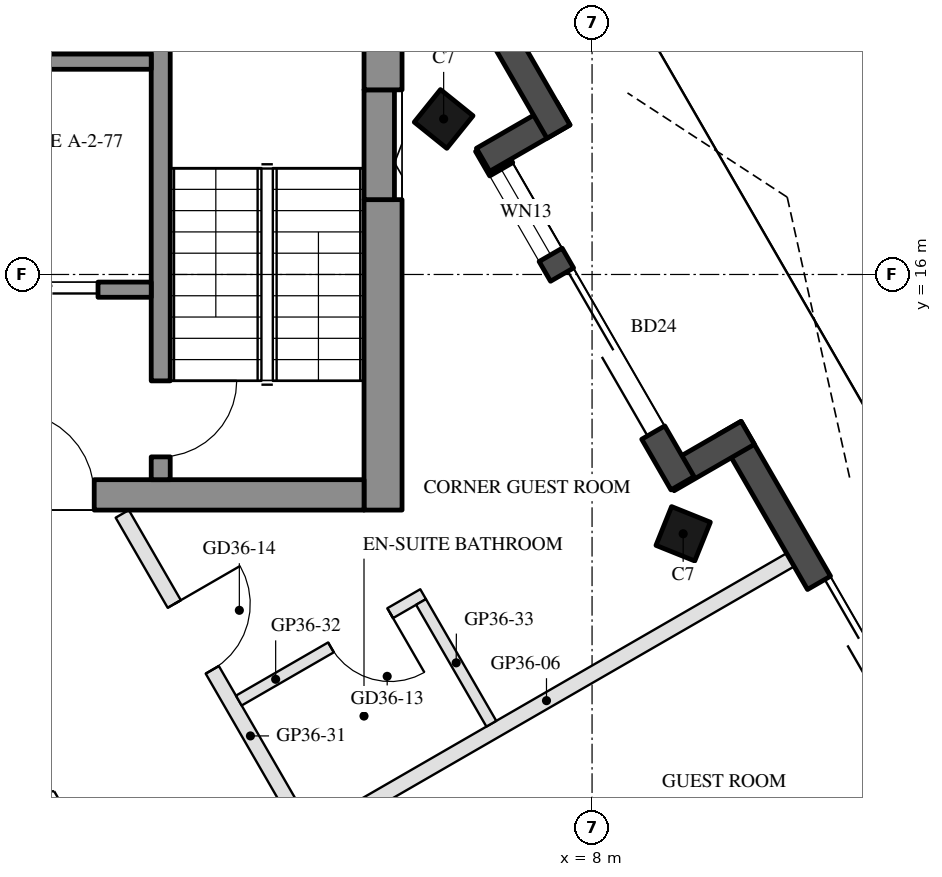
"""IFC4 building model, lengths in metres.
Left out: names, types, materials, properties, quantities, classifications, styles, units other than length and angle.
Written with IfcOpenShell. Run it as: python <this file> out.ifc"""

import sys

from ifc_helpers import new_model, si_unit, direction, frame, frame_2d, origin, origin_2d, place, context, subcontext, project, spatial, rectangle, hollow_rectangle, extrude, boolean, halfspace, element, fill, save


model = new_model("IFC4")
c1 = context("Model", 3, precision=1e-05, world=origin(), true_north=direction((0.0, 1.0)))
c2 = subcontext(c1, "Body", "Model", "MODEL_VIEW")
j1 = project(units=[si_unit("LENGTHUNIT", "METRE"), si_unit("PLANEANGLEUNIT", "RADIAN")], contexts=[c1])
p1 = place(None, origin())
s1 = spatial("IfcSite", under=j1, at=p1, CompositionType="ELEMENT")
p2 = place(p1, origin())
s2 = spatial("IfcBuilding", under=s1, at=p2, CompositionType="ELEMENT")
p3 = place(p2, frame((0.0, 0.0, 328.1)))
s3 = spatial("IfcBuildingStorey", under=s2, at=p3, CompositionType="ELEMENT", Elevation=328.1)
p4 = place(p3, frame((9.198, 12.588, 0.0), z_axis=(-0.100518021011, -0.128316722417, 0.98662604172), x_axis=(-0.503129383785, 0.862065632243, 0.060857775822)))
e1 = element("IfcColumn", 1, at=p4, inside=s3, PredefinedType="COLUMN", context=c2, shape_type="SweptSolid", body=[
    boolean("DIFFERENCE", boolean("DIFFERENCE", extrude(hollow_rectangle(XDim=0.55, YDim=0.55, WallThickness=0.025, at=origin_2d()), origin(), (0.0, 0.0, 1.0), 3.75), halfspace(frame((0.0, 0.0, 0.034), z_axis=(0.0, 0.0, 1.0), x_axis=(1.0, 0.0, 0.0)), True)), halfspace(frame((0.0, 0.0, 3.735), z_axis=(0.0, 0.0, 1.0), x_axis=(1.0, 0.0, 0.0)), False)),
])
p5 = place(p3, frame((6.047, 18.046, 0.0), z_axis=(-0.069728397733, -0.180050765176, 0.981182792608), x_axis=(-0.504276986778, 0.855013934028, 0.12106152661)))
e2 = element("IfcColumn", 2, at=p5, inside=s3, PredefinedType="COLUMN", context=c2, shape_type="SweptSolid", body=[
    boolean("DIFFERENCE", boolean("DIFFERENCE", extrude(hollow_rectangle(XDim=0.55, YDim=0.55, WallThickness=0.025, at=origin_2d()), origin(), (0.0, 0.0, 1.0), 3.771), halfspace(frame((0.0, 0.0, 0.04), z_axis=(0.0, 0.0, 1.0), x_axis=(1.0, 0.0, 0.0)), True)), halfspace(frame((0.0, 0.0, 3.753), z_axis=(0.0, 0.0, 1.0), x_axis=(1.0, 0.0, 0.0)), False)),
])
p6 = place(p3, frame((13.861, 6.963, 0.0), z_axis=(0.0, 0.0, 1.0), x_axis=(-0.499985896038, 0.866033546558, 0.0)))
e3 = element("IfcWall", 3, at=p6, inside=s3, PredefinedType="SOLIDWALL", context=c2, shape_type="SweptSolid", body=[
    extrude(rectangle(XDim=8.102, YDim=0.35, at=frame_2d((4.051, 0.0))), origin(), (0.0, 0.0, 1.0), 3.45),
])
p7 = place(p6, frame((3.95, 0.0, 0.0)))
e4 = element("IfcOpeningElement", 4, at=p7, cuts=e3, PredefinedType="OPENING", context=c2, shape_type="SweptSolid", body=[
    extrude(rectangle(XDim=1.8, YDim=2.4, at=frame_2d((0.9, 1.2))), frame((0.0, 0.185, 0.0), z_axis=(0.0, -1.0, 0.0), x_axis=(1.0, 0.0, 0.0)), (0.0, 0.0, 1.0), 0.37),
])
p8 = place(p6, frame((2.52, 0.0, 0.3)))
e5 = element("IfcOpeningElement", 5, at=p8, cuts=e3, PredefinedType="OPENING", context=c2, shape_type="SweptSolid", body=[
    extrude(rectangle(XDim=1.1, YDim=2.65, at=frame_2d((0.55, 1.325))), frame((0.0, 0.185, 0.0), z_axis=(0.0, -1.0, 0.0), x_axis=(1.0, 0.0, 0.0)), (0.0, 0.0, 1.0), 0.37),
])
p9 = place(p3, frame((10.049, 13.916, 0.0), z_axis=(0.0, 0.0, 1.0), x_axis=(-0.866005645448, -0.500034220881, 0.0)))
e6 = element("IfcWall", 6, at=p9, inside=s3, PredefinedType="SOLIDWALL", context=c2, shape_type="SweptSolid", body=[
    extrude(rectangle(XDim=1.22, YDim=0.35, at=frame_2d((0.61, 0.0))), origin(), (0.0, 0.0, 1.0), 3.45),
])
p10 = place(p3, frame((9.19, 13.253, 0.0), z_axis=(0.0, 0.0, 1.0), x_axis=(-0.499963552308, 0.866046445846, 0.0)))
e7 = element("IfcWall", 7, at=p10, inside=s3, PredefinedType="SOLIDWALL", context=c2, shape_type="SweptSolid", body=[
    extrude(rectangle(XDim=5.143, YDim=0.35, at=frame_2d((2.571, 0.0))), origin(), (0.0, 0.0, 1.0), 3.45),
])
p11 = place(p10, frame((0.77, 0.0, 0.0)))
e8 = element("IfcOpeningElement", 8, at=p11, cuts=e7, PredefinedType="OPENING", context=c2, shape_type="SweptSolid", body=[
    extrude(rectangle(XDim=2.4, YDim=2.4, at=frame_2d((1.2, 1.2))), frame((0.0, 0.185, 0.0), z_axis=(0.0, -1.0, 0.0), x_axis=(1.0, 0.0, 0.0)), (0.0, 0.0, 1.0), 0.37),
])
p12 = place(p10, frame((3.47, 0.0, 0.3)))
e9 = element("IfcOpeningElement", 9, at=p12, cuts=e7, PredefinedType="OPENING", context=c2, shape_type="SweptSolid", body=[
    extrude(rectangle(XDim=1.3, YDim=2.65, at=frame_2d((0.65, 1.325))), frame((0.0, 0.185, 0.0), z_axis=(0.0, -1.0, 0.0), x_axis=(1.0, 0.0, 0.0)), (0.0, 0.0, 1.0), 0.37),
])
p13 = place(p3, frame((6.566, 17.509, 0.0), z_axis=(0.0, 0.0, 1.0), x_axis=(0.866005645448, 0.500034220881, 0.0)))
e10 = element("IfcWall", 10, at=p13, inside=s3, PredefinedType="SOLIDWALL", context=c2, shape_type="SweptSolid", body=[
    extrude(rectangle(XDim=1.22, YDim=0.35, at=frame_2d((0.61, 0.0))), origin(), (0.0, 0.0, 1.0), 3.45),
])
p14 = place(p3, frame((7.558, 17.879, 0.0), z_axis=(0.0, 0.0, 1.0), x_axis=(-0.499967508769, 0.866044161793, 0.0)))
e11 = element("IfcWall", 11, at=p14, inside=s3, PredefinedType="SOLIDWALL", context=c2, shape_type="SweptSolid", body=[
    extrude(rectangle(XDim=3.306, YDim=0.35, at=frame_2d((1.653, 0.0))), origin(), (0.0, 0.0, 1.0), 3.45),
])
p15 = place(p14, frame((1.43, 0.0, 0.3)))
e12 = element("IfcOpeningElement", 12, at=p15, cuts=e11, PredefinedType="OPENING", context=c2, shape_type="SweptSolid", body=[
    extrude(rectangle(XDim=1.4, YDim=2.65, at=frame_2d((0.7, 1.325))), frame((0.0, 0.185, 0.0), z_axis=(0.0, -1.0, 0.0), x_axis=(1.0, 0.0, 0.0)), (0.0, 0.0, 1.0), 0.37),
])
p16 = place(p3, frame((5.25, 12.9, 0.0), z_axis=(0.0, 0.0, 1.0), x_axis=(0.0, 1.0, 0.0)))
e13 = element("IfcWall", 13, at=p16, inside=s3, PredefinedType="SHEAR", context=c2, shape_type="SweptSolid", body=[
    extrude(rectangle(XDim=4.085, YDim=0.5, at=frame_2d((2.042, 0.0))), origin(), (0.0, 0.0, 1.0), 3.45),
])
p17 = place(p3, frame((5.2, 16.985, 0.0), z_axis=(0.0, 0.0, 1.0), x_axis=(0.0, 1.0, 0.0)))
e14 = element("IfcWall", 14, at=p17, inside=s3, PredefinedType="SHEAR", context=c2, shape_type="SweptSolid", body=[
    extrude(rectangle(XDim=1.445, YDim=0.4, at=frame_2d((0.722, 0.0))), origin(), (0.0, 0.0, 1.0), 3.45),
])
p18 = place(p3, frame((5.25, 18.429, 0.0), z_axis=(0.0, 0.0, 1.0), x_axis=(0.0, 1.0, 0.0)))
e15 = element("IfcWall", 15, at=p18, inside=s3, PredefinedType="SHEAR", context=c2, shape_type="SweptSolid", body=[
    extrude(rectangle(XDim=2.738, YDim=0.5, at=frame_2d((1.369, 0.0))), origin(), (0.0, 0.0, 1.0), 3.45),
])
p19 = place(p3, frame((5.0, 13.1, 0.0), z_axis=(0.0, 0.0, 1.0), x_axis=(-1.0, 0.0, 0.0)))
e16 = element("IfcWall", 16, at=p19, inside=s3, PredefinedType="SHEAR", context=c2, shape_type="SweptSolid", body=[
    extrude(rectangle(XDim=10.0, YDim=0.4, at=frame_2d((5.0, 0.0))), origin(), (0.0, 0.0, 1.0), 3.45),
])
p20 = place(p19, frame((3.55, 0.0, 0.0)))
e17 = element("IfcOpeningElement", 17, at=p20, cuts=e16, PredefinedType="OPENING", context=c2, shape_type="SweptSolid", body=[
    extrude(rectangle(XDim=1.1, YDim=2.1, at=frame_2d((0.55, 1.05))), frame((0.0, 0.21, 0.0), z_axis=(0.0, -1.0, 0.0), x_axis=(1.0, 0.0, 0.0)), (0.0, 0.0, 1.0), 0.42),
])
p21 = place(p19, frame((5.85, 0.0, 0.0)))
e18 = element("IfcOpeningElement", 18, at=p21, cuts=e16, PredefinedType="OPENING", context=c2, shape_type="SweptSolid", body=[
    extrude(rectangle(XDim=1.4, YDim=2.1, at=frame_2d((0.7, 1.05))), frame((0.0, 0.21, 0.0), z_axis=(0.0, -1.0, 0.0), x_axis=(1.0, 0.0, 0.0)), (0.0, 0.0, 1.0), 0.42),
])
p22 = place(p3, frame((2.325, 13.3, 0.0), z_axis=(0.0, 0.0, 1.0), x_axis=(0.0, 1.0, 0.0)))
e19 = element("IfcWall", 19, at=p22, inside=s3, PredefinedType="SHEAR", context=c2, shape_type="SweptSolid", body=[
    extrude(rectangle(XDim=6.45, YDim=0.25, at=frame_2d((3.225, 0.0))), origin(), (0.0, 0.0, 1.0), 3.45),
])
p23 = place(p22, frame((0.3, 0.0, 0.0)))
e20 = element("IfcOpeningElement", 20, at=p23, cuts=e19, PredefinedType="OPENING", context=c2, shape_type="SweptSolid", body=[
    extrude(rectangle(XDim=1.0, YDim=2.1, at=frame_2d((0.5, 1.05))), frame((0.0, 0.135, 0.0), z_axis=(0.0, -1.0, 0.0), x_axis=(1.0, 0.0, 0.0)), (0.0, 0.0, 1.0), 0.27),
])
p24 = place(p3, frame((2.2, 18.8, 0.0), z_axis=(0.0, 0.0, 1.0), x_axis=(-1.0, 0.0, 0.0)))
e21 = element("IfcWall", 21, at=p24, inside=s3, PredefinedType="SHEAR", context=c2, shape_type="SweptSolid", body=[
    extrude(rectangle(XDim=2.8, YDim=0.2, at=frame_2d((1.4, 0.0))), origin(), (0.0, 0.0, 1.0), 3.45),
])
p25 = place(p3, frame((2.2, 15.8, 0.0), z_axis=(0.0, 0.0, 1.0), x_axis=(-1.0, 0.0, 0.0)))
e22 = element("IfcWall", 22, at=p25, inside=s3, PredefinedType="SHEAR", context=c2, shape_type="SweptSolid", body=[
    extrude(rectangle(XDim=2.8, YDim=0.2, at=frame_2d((1.4, 0.0))), origin(), (0.0, 0.0, 1.0), 3.45),
])
p26 = place(p25, frame((0.7, 0.0, 0.0)))
e23 = element("IfcOpeningElement", 23, at=p26, cuts=e22, PredefinedType="OPENING", context=c2, shape_type="SweptSolid", body=[
    extrude(rectangle(XDim=1.2, YDim=2.1, at=frame_2d((0.6, 1.05))), frame((0.0, 0.11, 0.0), z_axis=(0.0, -1.0, 0.0), x_axis=(1.0, 0.0, 0.0)), (0.0, 0.0, 1.0), 0.22),
])
p27 = place(p3, frame((10.609, 12.245, 0.0), z_axis=(0.0, 0.0, 1.0), x_axis=(-0.866014407023, -0.500019046465, 0.0)))
e24 = element("IfcWall", 24, at=p27, inside=s3, PredefinedType="PARTITIONING", context=c2, shape_type="SweptSolid", body=[
    extrude(rectangle(XDim=7.41, YDim=0.2, at=frame_2d((3.705, 0.0))), origin(), (0.0, 0.0, 1.0), 3.05),
])
p28 = place(p3, frame((1.819, 12.85, 0.0), z_axis=(0.0, 0.0, 1.0), x_axis=(0.500007490527, -0.866021079084, 0.0)))
e25 = element("IfcWall", 25, at=p28, inside=s3, PredefinedType="PARTITIONING", context=c2, shape_type="SweptSolid", body=[
    extrude(rectangle(XDim=4.819, YDim=0.2, at=frame_2d((2.41, 0.0))), origin(), (0.0, 0.0, 1.0), 3.05),
])
p29 = place(p28, frame((1.369, 0.0, 0.0)))
e26 = element("IfcOpeningElement", 26, at=p29, cuts=e25, PredefinedType="OPENING", context=c2, shape_type="SweptSolid", body=[
    extrude(rectangle(XDim=1.0, YDim=2.1, at=frame_2d((0.5, 1.05))), frame((0.0, 0.11, 0.0), z_axis=(0.0, -1.0, 0.0), x_axis=(1.0, 0.0, 0.0)), (0.0, 0.0, 1.0), 0.22),
])
p30 = place(p3, frame((5.777, 11.794, 0.0), z_axis=(0.0, 0.0, 1.0), x_axis=(-0.865996816683, -0.500049511043, 0.0)))
e27 = element("IfcWall", 27, at=p30, inside=s3, PredefinedType="PARTITIONING", context=c2, shape_type="SweptSolid", body=[
    extrude(rectangle(XDim=2.8, YDim=0.15, at=frame_2d((1.4, 0.0))), origin(), (0.0, 0.0, 1.0), 3.45),
])
p31 = place(p30, frame((0.5, 0.0, 0.0)))
e28 = element("IfcOpeningElement", 28, at=p31, cuts=e27, PredefinedType="OPENING", context=c2, shape_type="SweptSolid", body=[
    extrude(rectangle(XDim=0.9, YDim=2.1, at=frame_2d((0.45, 1.05))), frame((0.0, 0.085, 0.0), z_axis=(0.0, -1.0, 0.0), x_axis=(1.0, 0.0, 0.0)), (0.0, 0.0, 1.0), 0.17),
])
p32 = place(p3, frame((6.675, 10.089, 0.0), z_axis=(0.0, 0.0, 1.0), x_axis=(-0.500042316284, 0.866000971088, 0.0)))
e29 = element("IfcWall", 29, at=p32, inside=s3, PredefinedType="PARTITIONING", context=c2, shape_type="SweptSolid", body=[
    extrude(rectangle(XDim=1.85, YDim=0.15, at=frame_2d((0.925, 0.0))), origin(), (0.0, 0.0, 1.0), 3.05),
])
p33 = place(p7, frame((1.8, 0.0, 0.0), z_axis=(0.0, 0.0, 1.0), x_axis=(-1.0, 0.0, 0.0)))
e30 = element("IfcDoor", 30, at=p33, inside=s3, OperationType="SLIDING_TO_LEFT", PredefinedType="DOOR", context=c2, shape_type="SweptSolid", body=[
    extrude(rectangle(XDim=1.8, YDim=2.4, at=frame_2d((0.9, 1.2))), frame((0.0, 0.025, 0.0), z_axis=(0.0, -1.0, 0.0), x_axis=(1.0, 0.0, 0.0)), (0.0, 0.0, 1.0), 0.05),
])
fill(e4, e30)
p34 = place(p11, frame((2.4, 0.0, 0.0), z_axis=(0.0, 0.0, 1.0), x_axis=(-1.0, 0.0, 0.0)))
e31 = element("IfcDoor", 31, at=p34, inside=s3, OperationType="SLIDING_TO_LEFT", PredefinedType="DOOR", context=c2, shape_type="SweptSolid", body=[
    extrude(rectangle(XDim=2.4, YDim=2.4, at=frame_2d((1.2, 1.2))), frame((0.0, 0.025, 0.0), z_axis=(0.0, -1.0, 0.0), x_axis=(1.0, 0.0, 0.0)), (0.0, 0.0, 1.0), 0.05),
])
fill(e8, e31)
p35 = place(p12, origin())
e32 = element("IfcWindow", 32, at=p35, inside=s3, PartitioningType="SINGLE_PANEL", PredefinedType="WINDOW", context=c2, shape_type="SweptSolid", body=[
    extrude(rectangle(XDim=1.3, YDim=2.65, at=frame_2d((0.65, 1.325))), frame((0.0, 0.03, 0.0), z_axis=(0.0, -1.0, 0.0), x_axis=(1.0, 0.0, 0.0)), (0.0, 0.0, 1.0), 0.06),
])
fill(e9, e32)
p36 = place(p26, origin())
e33 = element("IfcDoor", 33, at=p36, inside=s3, OperationType="DOUBLE_DOOR_SLIDING", PredefinedType="DOOR", context=c2, shape_type="SweptSolid", body=[
    extrude(rectangle(XDim=1.2, YDim=2.1, at=frame_2d((0.6, 1.05))), frame((0.0, 0.025, 0.0), z_axis=(0.0, -1.0, 0.0), x_axis=(1.0, 0.0, 0.0)), (0.0, 0.0, 1.0), 0.05),
])
fill(e23, e33)
p37 = place(p20, frame((1.1, 0.0, 0.0), z_axis=(0.0, 0.0, 1.0), x_axis=(-1.0, 0.0, 0.0)))
e34 = element("IfcDoor", 34, at=p37, inside=s3, OperationType="SINGLE_SWING_LEFT", PredefinedType="DOOR", context=c2, shape_type="SweptSolid", body=[
    extrude(rectangle(XDim=1.1, YDim=2.1, at=frame_2d((0.55, 1.05))), frame((0.0, 0.025, 0.0), z_axis=(0.0, -1.0, 0.0), x_axis=(1.0, 0.0, 0.0)), (0.0, 0.0, 1.0), 0.05),
])
fill(e17, e34)
p38 = place(p23, frame((1.0, 0.0, 0.0), z_axis=(0.0, 0.0, 1.0), x_axis=(-1.0, 0.0, 0.0)))
e35 = element("IfcDoor", 35, at=p38, inside=s3, OperationType="SINGLE_SWING_LEFT", PredefinedType="DOOR", context=c2, shape_type="SweptSolid", body=[
    extrude(rectangle(XDim=1.0, YDim=2.1, at=frame_2d((0.5, 1.05))), frame((0.0, 0.025, 0.0), z_axis=(0.0, -1.0, 0.0), x_axis=(1.0, 0.0, 0.0)), (0.0, 0.0, 1.0), 0.05),
])
fill(e20, e35)
p39 = place(p31, origin())
e36 = element("IfcDoor", 36, at=p39, inside=s3, OperationType="SINGLE_SWING_LEFT", PredefinedType="DOOR", context=c2, shape_type="SweptSolid", body=[
    extrude(rectangle(XDim=0.9, YDim=2.1, at=frame_2d((0.45, 1.05))), frame((0.0, 0.025, 0.0), z_axis=(0.0, -1.0, 0.0), x_axis=(1.0, 0.0, 0.0)), (0.0, 0.0, 1.0), 0.05),
])
fill(e28, e36)
p40 = place(p29, origin())
e37 = element("IfcDoor", 37, at=p40, inside=s3, OperationType="SINGLE_SWING_LEFT", PredefinedType="DOOR", context=c2, shape_type="SweptSolid", body=[
    extrude(rectangle(XDim=1.0, YDim=2.1, at=frame_2d((0.5, 1.05))), frame((0.0, 0.025, 0.0), z_axis=(0.0, -1.0, 0.0), x_axis=(1.0, 0.0, 0.0)), (0.0, 0.0, 1.0), 0.05),
])
fill(e26, e37)
save(model, sys.argv[1])
